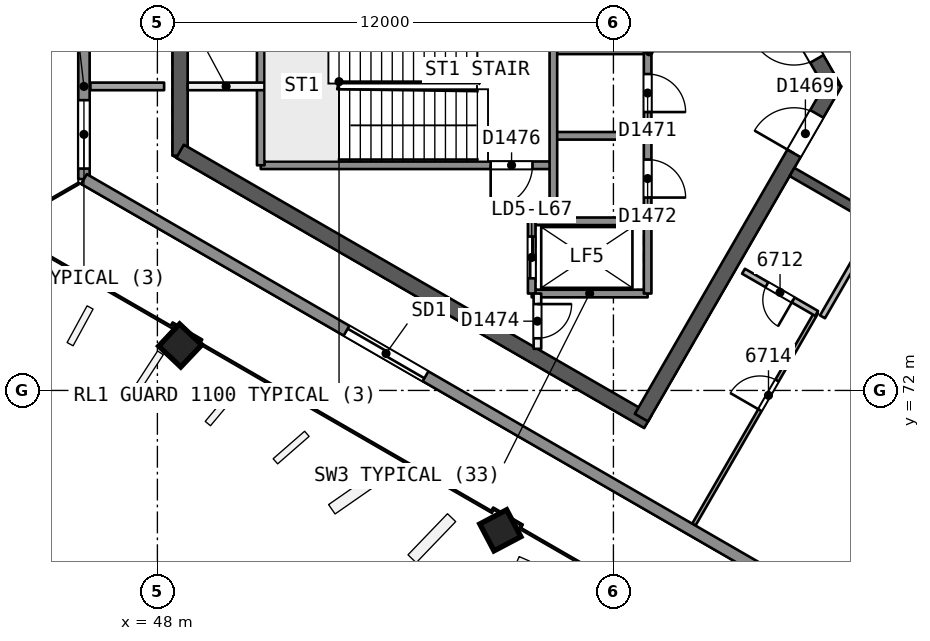
"""IFC4 building model, lengths in metres.
Left out: names, types, materials, properties, quantities, classifications, styles, units other than length and angle.
Written with IfcOpenShell. Run it as: python <this file> out.ifc"""

import sys

from ifc_helpers import new_model, si_unit, direction, frame, frame_2d, origin, origin_2d, place, context, subcontext, project, spatial, rectangle, extrude, element, fill, save


model = new_model("IFC4")
c1 = context("Model", 3, precision=1e-05, world=origin(), true_north=direction((0.0, 1.0)))
c2 = subcontext(c1, "Body", "Model", "MODEL_VIEW")
j1 = project(units=[si_unit("LENGTHUNIT", "METRE"), si_unit("PLANEANGLEUNIT", "RADIAN")], contexts=[c1])
p1 = place(None, origin())
s1 = spatial("IfcSite", under=j1, at=p1, CompositionType="ELEMENT")
p2 = place(p1, origin())
s2 = spatial("IfcBuilding", under=s1, at=p2, CompositionType="ELEMENT")
p3 = place(p2, frame((0.0, 0.0, 273.8)))
s3 = spatial("IfcBuildingStorey", under=s2, at=p3, CompositionType="ELEMENT", Elevation=273.8)
p4 = place(p3, frame((65.769, 80.0, 0.0), z_axis=(0.0, 0.0, 1.0), x_axis=(-0.50000177223, 0.866024380585, 0.0)))
e1 = element("IfcWall", 1, at=p4, inside=s3, PredefinedType="SHEAR", context=c2, shape_type="SweptSolid", body=[
    extrude(rectangle(XDim=10.265, YDim=0.4, at=frame_2d((5.132, 0.0))), origin(), (0.0, 0.0, 1.0), 3.7),
])
p5 = place(p4, frame((0.834, 0.0, 0.0)))
e2 = element("IfcOpeningElement", 2, at=p5, cuts=e1, PredefinedType="OPENING", context=c2, shape_type="SweptSolid", body=[
    extrude(rectangle(XDim=1.2, YDim=2.1, at=frame_2d((0.6, 1.05))), frame((0.0, 0.21, 0.0), z_axis=(0.0, -1.0, 0.0), x_axis=(1.0, 0.0, 0.0)), (0.0, 0.0, 1.0), 0.421),
])
p6 = place(p3, frame((48.597, 81.707, 0.0), z_axis=(0.0, 0.0, 1.0), x_axis=(0.0, -1.0, 0.0)))
e3 = element("IfcWall", 3, at=p6, inside=s3, PredefinedType="SHEAR", context=c2, shape_type="SweptSolid", body=[
    extrude(rectangle(XDim=3.53, YDim=0.4, at=frame_2d((1.765, 0.0))), origin(), (0.0, 0.0, 1.0), 3.7),
])
p7 = place(p3, frame((48.597, 78.293, 0.0), z_axis=(0.0, 0.0, 1.0), x_axis=(0.866026024469, -0.499998924941, 0.0)))
e4 = element("IfcWall", 4, at=p7, inside=s3, PredefinedType="SHEAR", context=c2, shape_type="SweptSolid", body=[
    extrude(rectangle(XDim=14.218, YDim=0.4, at=frame_2d((7.109, 0.0))), origin(), (0.0, 0.0, 1.0), 3.7),
])
p8 = place(p3, frame((60.737, 71.284, 0.0), z_axis=(0.0, 0.0, 1.0), x_axis=(0.50000547566, 0.866022242388, 0.0)))
e5 = element("IfcWall", 5, at=p8, inside=s3, PredefinedType="SHEAR", context=c2, shape_type="SweptSolid", body=[
    extrude(rectangle(XDim=10.18, YDim=0.4, at=frame_2d((5.09, 0.0))), origin(), (0.0, 0.0, 1.0), 3.7),
])
p9 = place(p8, frame((8.03, 0.0, 0.0)))
e6 = element("IfcOpeningElement", 6, at=p9, cuts=e5, PredefinedType="OPENING", context=c2, shape_type="SweptSolid", body=[
    extrude(rectangle(XDim=1.2, YDim=2.1, at=frame_2d((0.6, 1.05))), frame((0.0, 0.21, 0.0), z_axis=(0.0, -1.0, 0.0), x_axis=(1.0, 0.0, 0.0)), (0.0, 0.0, 1.0), 0.421),
])
p10 = place(p3, frame((64.7, 77.748, 0.0), z_axis=(0.0, 0.0, 1.0), x_axis=(0.866026492143, -0.499998114903, 0.0)))
e7 = element("IfcWall", 7, at=p10, inside=s3, PredefinedType="SHEAR", context=c2, shape_type="SweptSolid", body=[
    extrude(rectangle(XDim=15.588, YDim=0.25, at=frame_2d((7.794, 0.0))), origin(), (0.0, 0.0, 1.0), 3.3),
])
p11 = place(p10, frame((4.473, 0.0, 0.0)))
e8 = element("IfcOpeningElement", 8, at=p11, cuts=e7, PredefinedType="OPENING", context=c2, shape_type="SweptSolid", body=[
    extrude(rectangle(XDim=1.0, YDim=2.1, at=frame_2d((0.5, 1.05))), frame((0.0, 0.135, 0.0), z_axis=(0.0, -1.0, 0.0), x_axis=(1.0, 0.0, 0.0)), (0.0, 0.0, 1.0), 0.271),
])
p12 = place(p10, frame((13.917, 0.0, 0.0)))
e9 = element("IfcOpeningElement", 9, at=p12, cuts=e7, PredefinedType="OPENING", context=c2, shape_type="SweptSolid", body=[
    extrude(rectangle(XDim=1.1, YDim=2.1, at=frame_2d((0.55, 1.05))), frame((0.0, 0.135, 0.0), z_axis=(0.0, -1.0, 0.0), x_axis=(1.0, 0.0, 0.0)), (0.0, 0.0, 1.0), 0.271),
])
p13 = place(p3, frame((48.566, 73.175, 0.0), z_axis=(0.02855911485, 0.006793507689, 0.999569019734), x_axis=(-0.865318766308, 0.500768301983, 0.021319953197)))
e10 = element("IfcColumn", 10, at=p13, inside=s3, PredefinedType="COLUMN", context=c2, shape_type="SweptSolid", body=[
    extrude(rectangle(XDim=0.8, YDim=0.8, at=origin_2d()), origin(), (0.0, 0.0, 1.0), 3.702),
])
p14 = place(p3, frame((57.001, 68.305, 0.0), z_axis=(0.019328516974, 0.012138044789, 0.999739504221), x_axis=(-0.865689041461, 0.500468616527, 0.010660551878)))
e11 = element("IfcColumn", 11, at=p14, inside=s3, PredefinedType="COLUMN", context=c2, shape_type="SweptSolid", body=[
    extrude(rectangle(XDim=0.8, YDim=0.8, at=origin_2d()), origin(), (0.0, 0.0, 1.0), 3.701),
])
p15 = place(p3, frame((46.237, 80.0, 0.0), z_axis=(0.0, 0.0, 1.0), x_axis=(1.0, 0.0, 0.0)))
e12 = element("IfcWall", 12, at=p15, inside=s3, PredefinedType="PARTITIONING", context=c2, shape_type="SweptSolid", body=[
    extrude(rectangle(XDim=1.94, YDim=0.2, at=frame_2d((0.97, 0.0))), origin(), (0.0, 0.0, 1.0), 3.3),
])
p16 = place(p3, frame((62.116, 68.469, 0.0), z_axis=(0.0, 0.0, 1.0), x_axis=(0.499987977232, 0.866032345022, 0.0)))
e13 = element("IfcWall", 13, at=p16, inside=s3, PredefinedType="PARTITIONING", context=c2, shape_type="SweptSolid", body=[
    extrude(rectangle(XDim=6.447, YDim=0.1, at=frame_2d((3.224, 0.0))), origin(), (0.0, 0.0, 1.0), 3.3),
])
p17 = place(p16, frame((3.478, 0.0, 0.0)))
e14 = element("IfcOpeningElement", 14, at=p17, cuts=e13, PredefinedType="OPENING", context=c2, shape_type="SweptSolid", body=[
    extrude(rectangle(XDim=0.9, YDim=2.1, at=frame_2d((0.45, 1.05))), frame((0.0, 0.061, 0.0), z_axis=(0.0, -1.0, 0.0), x_axis=(1.0, 0.0, 0.0)), (0.0, 0.0, 1.0), 0.121),
])
p18 = place(p3, frame((65.347, 74.026, 0.0), z_axis=(0.0, 0.0, 1.0), x_axis=(-0.866042797968, 0.49996987118, 0.0)))
e15 = element("IfcWall", 15, at=p18, inside=s3, PredefinedType="PARTITIONING", context=c2, shape_type="SweptSolid", body=[
    extrude(rectangle(XDim=2.221, YDim=0.15, at=frame_2d((1.11, 0.0))), origin(), (0.0, 0.0, 1.0), 3.3),
])
p19 = place(p18, frame((0.711, 0.0, 0.0)))
e16 = element("IfcOpeningElement", 16, at=p19, cuts=e15, PredefinedType="OPENING", context=c2, shape_type="SweptSolid", body=[
    extrude(rectangle(XDim=0.8, YDim=2.1, at=frame_2d((0.4, 1.05))), frame((0.0, 0.085, 0.0), z_axis=(0.0, -1.0, 0.0), x_axis=(1.0, 0.0, 0.0)), (0.0, 0.0, 1.0), 0.171),
])
p20 = place(p3, frame((66.952, 76.448, 0.0), z_axis=(0.0, 0.0, 1.0), x_axis=(-0.499987231761, -0.866032775405, 0.0)))
e17 = element("IfcWall", 17, at=p20, inside=s3, PredefinedType="PARTITIONING", context=c2, shape_type="SweptSolid", body=[
    extrude(rectangle(XDim=2.9, YDim=0.15, at=frame_2d((1.45, 0.0))), origin(), (0.0, 0.0, 1.0), 3.3),
])
p21 = place(p3, frame((46.067, 77.562, 0.0), z_axis=(0.0, 0.0, 1.0), x_axis=(0.0, 1.0, 0.0)))
e18 = element("IfcWall", 18, at=p21, inside=s3, PredefinedType="SOLIDWALL", context=c2, shape_type="SweptSolid", body=[
    extrude(rectangle(XDim=4.876, YDim=0.3, at=frame_2d((2.438, 0.0))), origin(), (0.0, 0.0, 1.0), 3.3),
])
p22 = place(p21, frame((0.276, 0.0, 0.9)))
e19 = element("IfcOpeningElement", 19, at=p22, cuts=e18, PredefinedType="OPENING", context=c2, shape_type="SweptSolid", body=[
    extrude(rectangle(XDim=1.8, YDim=1.5, at=frame_2d((0.9, 0.75))), frame((0.0, 0.161, 0.0), z_axis=(0.0, -1.0, 0.0), x_axis=(1.0, 0.0, 0.0)), (0.0, 0.0, 1.0), 0.321),
])
p23 = place(p3, frame((87.355, 53.724, 0.0), z_axis=(0.0, 0.0, 1.0), x_axis=(-0.866024153303, 0.50000216589, 0.0)))
e20 = element("IfcWall", 20, at=p23, inside=s3, PredefinedType="SOLIDWALL", context=c2, shape_type="SweptSolid", body=[
    extrude(rectangle(XDim=47.675, YDim=0.3, at=frame_2d((23.837, 0.0))), origin(), (0.0, 0.0, 1.0), 3.3),
])
p24 = place(p23, frame((17.415, 0.0, 0.0)))
e21 = element("IfcOpeningElement", 21, at=p24, cuts=e20, PredefinedType="OPENING", context=c2, shape_type="SweptSolid", body=[
    extrude(rectangle(XDim=2.4, YDim=2.4, at=frame_2d((1.2, 1.2))), frame((0.0, 0.161, 0.0), z_axis=(0.0, -1.0, 0.0), x_axis=(1.0, 0.0, 0.0)), (0.0, 0.0, 1.0), 0.321),
])
p25 = place(p23, frame((37.296, 0.0, 0.0)))
e22 = element("IfcOpeningElement", 22, at=p25, cuts=e20, PredefinedType="OPENING", context=c2, shape_type="SweptSolid", body=[
    extrude(rectangle(XDim=2.4, YDim=2.4, at=frame_2d((1.2, 1.2))), frame((0.0, 0.161, 0.0), z_axis=(0.0, -1.0, 0.0), x_axis=(1.0, 0.0, 0.0)), (0.0, 0.0, 1.0), 0.321),
])
p26 = place(p23, frame((24.008, 0.0, 0.0)))
e23 = element("IfcOpeningElement", 23, at=p26, cuts=e20, PredefinedType="OPENING", context=c2, shape_type="SweptSolid", body=[
    extrude(rectangle(XDim=2.4, YDim=2.4, at=frame_2d((1.2, 1.2))), frame((0.0, 0.161, 0.0), z_axis=(0.0, -1.0, 0.0), x_axis=(1.0, 0.0, 0.0)), (0.0, 0.0, 1.0), 0.321),
])
p27 = place(p3, frame((60.9, 80.95, 0.0), z_axis=(0.0, 0.0, 1.0), x_axis=(-1.0, 0.0, 0.0)))
e24 = element("IfcWall", 24, at=p27, inside=s3, PredefinedType="SOLIDWALL", context=c2, shape_type="SweptSolid", body=[
    extrude(rectangle(XDim=2.48, YDim=0.2, at=frame_2d((1.24, 0.0))), origin(), (0.0, 0.0, 1.0), 3.3),
])
p28 = place(p3, frame((50.82, 80.0, 0.0), z_axis=(0.0, 0.0, 1.0), x_axis=(-1.0, 0.0, 0.0)))
e25 = element("IfcWall", 25, at=p28, inside=s3, PredefinedType="PARTITIONING", context=c2, shape_type="SweptSolid", body=[
    extrude(rectangle(XDim=2.023, YDim=0.2, at=frame_2d((1.012, 0.0))), origin(), (0.0, 0.0, 1.0), 3.3),
])
p29 = place(p3, frame((60.9, 78.7, 0.0), z_axis=(0.0, 0.0, 1.0), x_axis=(-1.0, 0.0, 0.0)))
e26 = element("IfcWall", 26, at=p29, inside=s3, PredefinedType="SOLIDWALL", context=c2, shape_type="SweptSolid", body=[
    extrude(rectangle(XDim=2.48, YDim=0.2, at=frame_2d((1.24, 0.0))), origin(), (0.0, 0.0, 1.0), 3.3),
])
p30 = place(p3, frame((58.42, 77.925, 0.0), z_axis=(0.0, 0.0, 1.0), x_axis=(-1.0, 0.0, 0.0)))
e27 = element("IfcWall", 27, at=p30, inside=s3, PredefinedType="SOLIDWALL", context=c2, shape_type="SweptSolid", body=[
    extrude(rectangle(XDim=7.7, YDim=0.2, at=frame_2d((3.85, 0.0))), origin(), (0.0, 0.0, 1.0), 3.3),
])
p31 = place(p30, frame((0.55, 0.0, 0.0)))
e28 = element("IfcOpeningElement", 28, at=p31, cuts=e27, PredefinedType="OPENING", context=c2, shape_type="SweptSolid", body=[
    extrude(rectangle(XDim=1.1, YDim=2.1, at=frame_2d((0.55, 1.05))), frame((0.0, 0.11, 0.0), z_axis=(0.0, -1.0, 0.0), x_axis=(1.0, 0.0, 0.0)), (0.0, 0.0, 1.0), 0.221),
])
for number, where, z_axis, x_axis in (
    (29, (60.9, 76.45, 0.0), (0.0, 0.0, 1.0), (-1.0, 0.0, 0.0)),
    (30, (60.9, 74.55, 0.0), (0.0, 0.0, 1.0), (-1.0, 0.0, 0.0)),
):
    element("IfcWall", number, at=place(p3, frame(where, z_axis=z_axis, x_axis=x_axis)), inside=s3, PredefinedType="SOLIDWALL", context=c2, shape_type="SweptSolid", body=[
        extrude(rectangle(XDim=3.05, YDim=0.2, at=frame_2d((1.525, 0.0))), origin(), (0.0, 0.0, 1.0), 3.3),
    ])
p32 = place(p3, frame((60.9, 85.45, 0.0), z_axis=(0.0, 0.0, 1.0), x_axis=(0.0, -1.0, 0.0)))
e31 = element("IfcWall", 31, at=p32, inside=s3, PredefinedType="SOLIDWALL", context=c2, shape_type="SweptSolid", body=[
    extrude(rectangle(XDim=10.9, YDim=0.2, at=frame_2d((5.45, 0.0))), origin(), (0.0, 0.0, 1.0), 3.3),
])
p33 = place(p32, frame((1.75, 0.0, 0.0)))
e32 = element("IfcOpeningElement", 32, at=p33, cuts=e31, PredefinedType="OPENING", context=c2, shape_type="SweptSolid", body=[
    extrude(rectangle(XDim=1.0, YDim=2.1, at=frame_2d((0.5, 1.05))), frame((0.0, 0.11, 0.0), z_axis=(0.0, -1.0, 0.0), x_axis=(1.0, 0.0, 0.0)), (0.0, 0.0, 1.0), 0.221),
])
p34 = place(p32, frame((5.125, 0.0, 0.0)))
e33 = element("IfcOpeningElement", 33, at=p34, cuts=e31, PredefinedType="OPENING", context=c2, shape_type="SweptSolid", body=[
    extrude(rectangle(XDim=1.0, YDim=2.1, at=frame_2d((0.5, 1.05))), frame((0.0, 0.11, 0.0), z_axis=(0.0, -1.0, 0.0), x_axis=(1.0, 0.0, 0.0)), (0.0, 0.0, 1.0), 0.221),
])
p35 = place(p32, frame((7.375, 0.0, 0.0)))
e34 = element("IfcOpeningElement", 34, at=p35, cuts=e31, PredefinedType="OPENING", context=c2, shape_type="SweptSolid", body=[
    extrude(rectangle(XDim=1.0, YDim=2.1, at=frame_2d((0.5, 1.05))), frame((0.0, 0.11, 0.0), z_axis=(0.0, -1.0, 0.0), x_axis=(1.0, 0.0, 0.0)), (0.0, 0.0, 1.0), 0.221),
])
p36 = place(p3, frame((58.42, 87.148, 0.0), z_axis=(0.0, 0.0, 1.0), x_axis=(0.0, -1.0, 0.0)))
e35 = element("IfcWall", 35, at=p36, inside=s3, PredefinedType="SOLIDWALL", context=c2, shape_type="SweptSolid", body=[
    extrude(rectangle(XDim=10.698, YDim=0.2, at=frame_2d((5.349, 0.0))), origin(), (0.0, 0.0, 1.0), 3.3),
])
p37 = place(p36, frame((0.399, 0.0, 0.0)))
e36 = element("IfcOpeningElement", 36, at=p37, cuts=e35, PredefinedType="OPENING", context=c2, shape_type="SweptSolid", body=[
    extrude(rectangle(XDim=0.9, YDim=2.1, at=frame_2d((0.45, 1.05))), frame((0.0, 0.11, 0.0), z_axis=(0.0, -1.0, 0.0), x_axis=(1.0, 0.0, 0.0)), (0.0, 0.0, 1.0), 0.221),
])
p38 = place(p3, frame((58.0, 74.55, 0.0), z_axis=(0.0, 0.0, 1.0), x_axis=(0.0, -1.0, 0.0)))
e37 = element("IfcWall", 37, at=p38, inside=s3, PredefinedType="PARTITIONING", context=c2, shape_type="SweptSolid", body=[
    extrude(rectangle(XDim=1.455, YDim=0.2, at=frame_2d((0.728, 0.0))), origin(), (0.0, 0.0, 1.0), 3.3),
])
p39 = place(p38, frame((0.278, 0.0, 0.0)))
e38 = element("IfcOpeningElement", 38, at=p39, cuts=e37, PredefinedType="OPENING", context=c2, shape_type="SweptSolid", body=[
    extrude(rectangle(XDim=0.9, YDim=2.1, at=frame_2d((0.45, 1.05))), frame((0.0, 0.11, 0.0), z_axis=(0.0, -1.0, 0.0), x_axis=(1.0, 0.0, 0.0)), (0.0, 0.0, 1.0), 0.221),
])
p40 = place(p3, frame((57.85, 76.45, 0.0), z_axis=(0.0, 0.0, 1.0), x_axis=(0.0, -1.0, 0.0)))
e39 = element("IfcWall", 39, at=p40, inside=s3, PredefinedType="SOLIDWALL", context=c2, shape_type="SweptSolid", body=[
    extrude(rectangle(XDim=1.9, YDim=0.2, at=frame_2d((0.95, 0.0))), origin(), (0.0, 0.0, 1.0), 3.3),
])
p41 = place(p40, frame((0.4, 0.0, 0.0)))
e40 = element("IfcOpeningElement", 40, at=p41, cuts=e39, PredefinedType="OPENING", context=c2, shape_type="SweptSolid", body=[
    extrude(rectangle(XDim=1.1, YDim=2.1, at=frame_2d((0.55, 1.05))), frame((0.0, 0.11, 0.0), z_axis=(0.0, -1.0, 0.0), x_axis=(1.0, 0.0, 0.0)), (0.0, 0.0, 1.0), 0.221),
])
p42 = place(p3, frame((50.72, 82.075, 0.0), z_axis=(0.0, 0.0, 1.0), x_axis=(0.0, -1.0, 0.0)))
e41 = element("IfcWall", 41, at=p42, inside=s3, PredefinedType="SOLIDWALL", context=c2, shape_type="SweptSolid", body=[
    extrude(rectangle(XDim=4.15, YDim=0.2, at=frame_2d((2.075, 0.0))), origin(), (0.0, 0.0, 1.0), 3.3),
])
p43 = place(p19, origin())
e42 = element("IfcDoor", 42, at=p43, inside=s3, OperationType="SINGLE_SWING_LEFT", PredefinedType="NOTDEFINED", context=c2, shape_type="SweptSolid", body=[
    extrude(rectangle(XDim=0.8, YDim=2.1, at=frame_2d((0.4, 1.05))), frame((0.0, 0.025, 0.0), z_axis=(0.0, -1.0, 0.0), x_axis=(1.0, 0.0, 0.0)), (0.0, 0.0, 1.0), 0.05),
])
fill(e16, e42)
p44 = place(p17, origin())
e43 = element("IfcDoor", 43, at=p44, inside=s3, OperationType="SINGLE_SWING_LEFT", PredefinedType="NOTDEFINED", context=c2, shape_type="SweptSolid", body=[
    extrude(rectangle(XDim=0.9, YDim=2.1, at=frame_2d((0.45, 1.05))), frame((0.0, 0.025, 0.0), z_axis=(0.0, -1.0, 0.0), x_axis=(1.0, 0.0, 0.0)), (0.0, 0.0, 1.0), 0.05),
])
fill(e14, e43)
p45 = place(p22, origin())
e44 = element("IfcWindow", 44, at=p45, inside=s3, PartitioningType="SINGLE_PANEL", PredefinedType="WINDOW", context=c2, shape_type="SweptSolid", body=[
    extrude(rectangle(XDim=1.8, YDim=1.5, at=frame_2d((0.9, 0.75))), frame((0.0, 0.03, 0.0), z_axis=(0.0, -1.0, 0.0), x_axis=(1.0, 0.0, 0.0)), (0.0, 0.0, 1.0), 0.06),
])
fill(e19, e44)
p46 = place(p25, origin())
e45 = element("IfcDoor", 45, at=p46, inside=s3, OperationType="SLIDING_TO_RIGHT", PredefinedType="NOTDEFINED", context=c2, shape_type="SweptSolid", body=[
    extrude(rectangle(XDim=2.4, YDim=2.4, at=frame_2d((1.2, 1.2))), frame((0.0, 0.025, 0.0), z_axis=(0.0, -1.0, 0.0), x_axis=(1.0, 0.0, 0.0)), (0.0, 0.0, 1.0), 0.05),
])
fill(e22, e45)
p47 = place(p5, origin())
e46 = element("IfcDoor", 46, at=p47, inside=s3, OperationType="SINGLE_SWING_RIGHT", PredefinedType="NOTDEFINED", context=c2, shape_type="SweptSolid", body=[
    extrude(rectangle(XDim=1.2, YDim=2.1, at=frame_2d((0.6, 1.05))), frame((0.0, 0.025, 0.0), z_axis=(0.0, -1.0, 0.0), x_axis=(1.0, 0.0, 0.0)), (0.0, 0.0, 1.0), 0.05),
])
fill(e2, e46)
p48 = place(p9, origin())
e47 = element("IfcDoor", 47, at=p48, inside=s3, OperationType="SINGLE_SWING_LEFT", PredefinedType="NOTDEFINED", context=c2, shape_type="SweptSolid", body=[
    extrude(rectangle(XDim=1.2, YDim=2.1, at=frame_2d((0.6, 1.05))), frame((0.0, 0.025, 0.0), z_axis=(0.0, -1.0, 0.0), x_axis=(1.0, 0.0, 0.0)), (0.0, 0.0, 1.0), 0.05),
])
fill(e6, e47)
p49 = place(p41, origin())
e48 = element("IfcDoor", 48, at=p49, inside=s3, OperationType="SLIDING_TO_RIGHT", PredefinedType="NOTDEFINED", context=c2, shape_type="SweptSolid", body=[
    extrude(rectangle(XDim=1.1, YDim=2.1, at=frame_2d((0.55, 1.05))), frame((0.0, 0.025, 0.0), z_axis=(0.0, -1.0, 0.0), x_axis=(1.0, 0.0, 0.0)), (0.0, 0.0, 1.0), 0.05),
])
fill(e40, e48)
p50 = place(p34, origin())
e49 = element("IfcDoor", 49, at=p50, inside=s3, OperationType="SINGLE_SWING_RIGHT", PredefinedType="NOTDEFINED", context=c2, shape_type="SweptSolid", body=[
    extrude(rectangle(XDim=1.0, YDim=2.1, at=frame_2d((0.5, 1.05))), frame((0.0, 0.025, 0.0), z_axis=(0.0, -1.0, 0.0), x_axis=(1.0, 0.0, 0.0)), (0.0, 0.0, 1.0), 0.05),
])
fill(e33, e49)
p51 = place(p35, origin())
e50 = element("IfcDoor", 50, at=p51, inside=s3, OperationType="SINGLE_SWING_RIGHT", PredefinedType="NOTDEFINED", context=c2, shape_type="SweptSolid", body=[
    extrude(rectangle(XDim=1.0, YDim=2.1, at=frame_2d((0.5, 1.05))), frame((0.0, 0.025, 0.0), z_axis=(0.0, -1.0, 0.0), x_axis=(1.0, 0.0, 0.0)), (0.0, 0.0, 1.0), 0.05),
])
fill(e34, e50)
p52 = place(p39, origin())
e51 = element("IfcDoor", 51, at=p52, inside=s3, OperationType="SINGLE_SWING_LEFT", PredefinedType="NOTDEFINED", context=c2, shape_type="SweptSolid", body=[
    extrude(rectangle(XDim=0.9, YDim=2.1, at=frame_2d((0.45, 1.05))), frame((0.0, 0.025, 0.0), z_axis=(0.0, -1.0, 0.0), x_axis=(1.0, 0.0, 0.0)), (0.0, 0.0, 1.0), 0.05),
])
fill(e38, e51)
p53 = place(p31, origin())
e52 = element("IfcDoor", 52, at=p53, inside=s3, OperationType="SINGLE_SWING_RIGHT", PredefinedType="NOTDEFINED", context=c2, shape_type="SweptSolid", body=[
    extrude(rectangle(XDim=1.1, YDim=2.1, at=frame_2d((0.55, 1.05))), frame((0.0, 0.025, 0.0), z_axis=(0.0, -1.0, 0.0), x_axis=(1.0, 0.0, 0.0)), (0.0, 0.0, 1.0), 0.05),
])
fill(e28, e52)
save(model, sys.argv[1])
